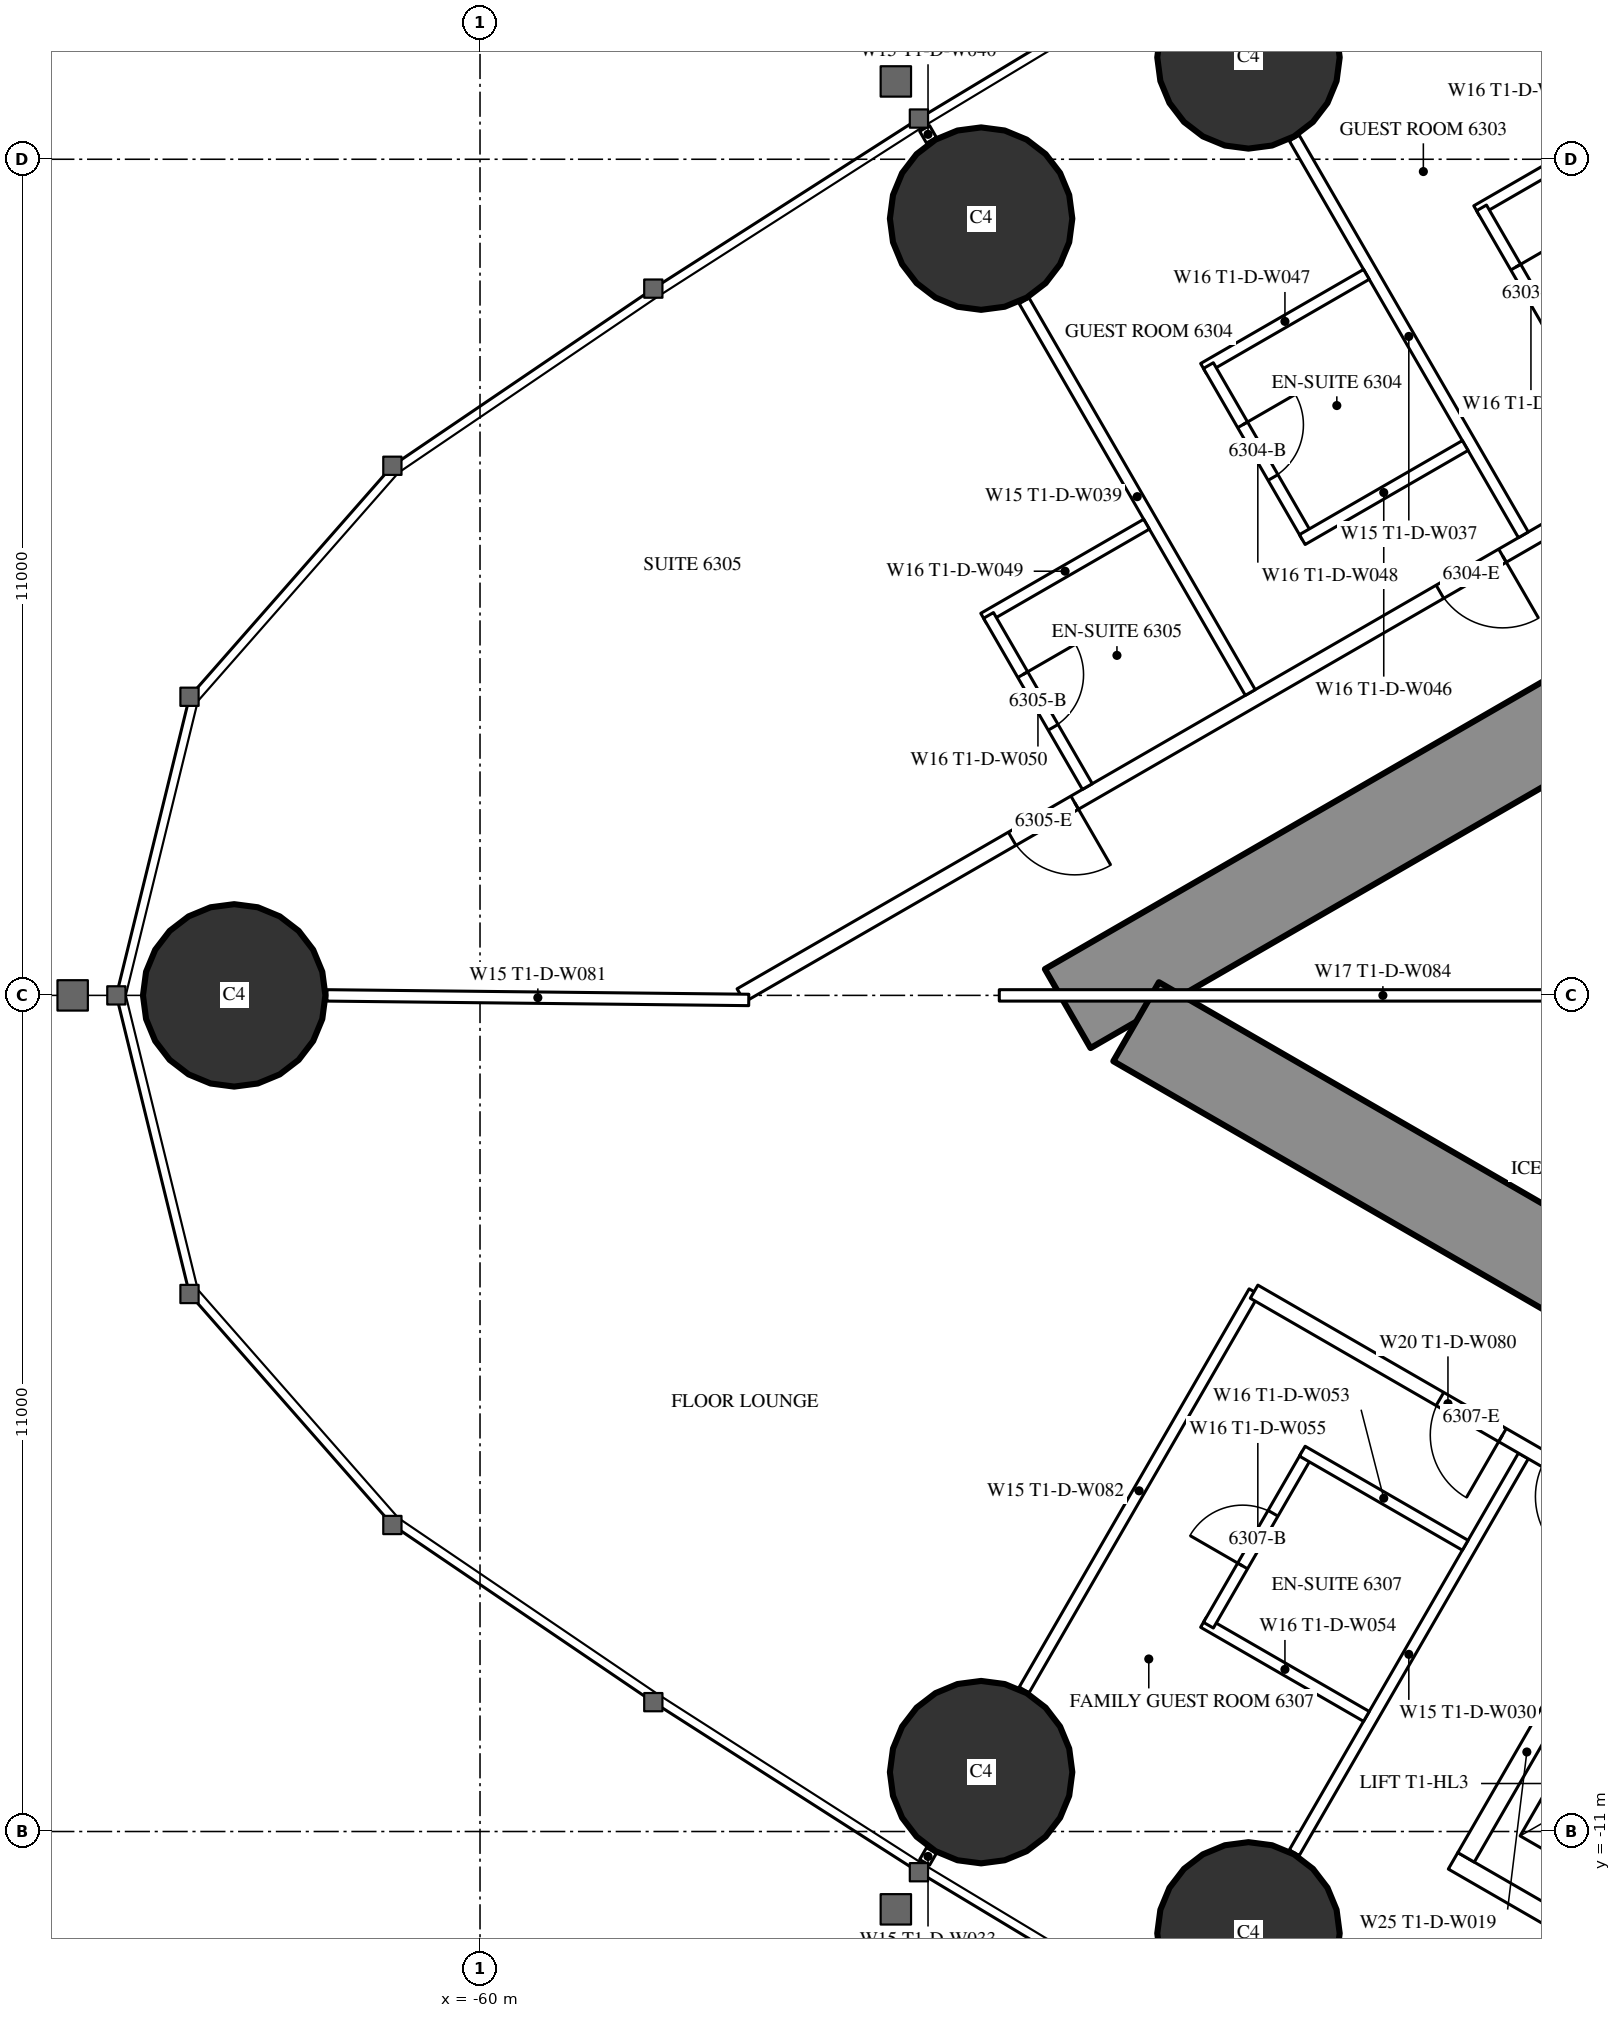
"""IFC4 building model, lengths in metres.
Left out: names, types, materials, properties, quantities, classifications, styles, units other than length and angle.
Written with IfcOpenShell. Run it as: python <this file> out.ifc"""

import sys

from ifc_helpers import new_model, si_unit, direction, frame, frame_2d, origin, origin_2d, place, context, subcontext, project, spatial, rectangle, circle, extrude, element, fill, save


model = new_model("IFC4")
c1 = context("Model", 3, precision=1e-05, world=origin(), true_north=direction((0.0, 1.0)))
c2 = subcontext(c1, "Body", "Model", "MODEL_VIEW")
j1 = project(units=[si_unit("LENGTHUNIT", "METRE"), si_unit("PLANEANGLEUNIT", "RADIAN")], contexts=[c1])
p1 = place(None, origin())
s1 = spatial("IfcSite", under=j1, at=p1, CompositionType="ELEMENT")
p2 = place(p1, origin())
s2 = spatial("IfcBuilding", under=s1, at=p2, CompositionType="ELEMENT")
p3 = place(p2, frame((0.0, 0.0, 236.9)))
s3 = spatial("IfcBuildingStorey", under=s2, at=p3, CompositionType="ELEMENT", Elevation=236.9)
for number, where, z_axis, x_axis in (
    (1, (-63.234, 0.0, 0.0), (0.0, 0.0, 1.0), (1.0, 0.0, 0.0)),
    (2, (-53.408, -10.219, 0.0), (0.0, 0.0, 1.0), (1.0, 0.0, 0.0)),
    (3, (-49.89, -12.34, 0.0), (0.0, 0.0, 1.0), (1.0, 0.0, 0.0)),
    (4, (-49.89, 12.34, 0.0), (0.0, 0.0, 1.0), (1.0, 0.0, 0.0)),
    (5, (-53.408, 10.219, 0.0), (0.0, 0.0, 1.0), (1.0, 0.0, 0.0)),
):
    element("IfcColumn", number, at=place(p3, frame(where, z_axis=z_axis, x_axis=x_axis)), inside=s3, PredefinedType="COLUMN", context=c2, shape_type="SweptSolid", body=[
        extrude(circle(Radius=1.2, at=origin_2d()), origin(), (0.0, 0.0, 1.0), 3.6),
    ])
p4 = place(p3, frame((-27.2, 14.3, 0.0), z_axis=(0.0, 0.0, 1.0), x_axis=(-0.866026593062, -0.499997940104, 0.0)))
e6 = element("IfcWall", 6, at=p4, inside=s3, PredefinedType="SHEAR", context=c2, shape_type="SweptSolid", body=[
    extrude(rectangle(XDim=28.946, YDim=1.2, at=frame_2d((14.473, 0.0))), origin(), (0.0, 0.0, 1.0), 3.6),
])
p5 = place(p4, frame((4.6, 0.0, 0.0)))
e7 = element("IfcOpeningElement", 7, at=p5, cuts=e6, PredefinedType="OPENING", context=c2, shape_type="SweptSolid", body=[
    extrude(rectangle(XDim=1.0, YDim=2.2, at=frame_2d((0.5, 1.1))), frame((0.0, 0.61, 0.0), z_axis=(0.0, -1.0, 0.0), x_axis=(1.0, 0.0, 0.0)), (0.0, 0.0, 1.0), 1.22),
])
p6 = place(p4, frame((13.395, 0.0, 0.0)))
e8 = element("IfcOpeningElement", 8, at=p6, cuts=e6, PredefinedType="OPENING", context=c2, shape_type="SweptSolid", body=[
    extrude(rectangle(XDim=1.8, YDim=2.2, at=frame_2d((0.9, 1.1))), frame((0.0, 0.61, 0.0), z_axis=(0.0, -1.0, 0.0), x_axis=(1.0, 0.0, 0.0)), (0.0, 0.0, 1.0), 1.22),
])
p7 = place(p3, frame((-27.2, -14.3, 0.0), z_axis=(0.0, 0.0, 1.0), x_axis=(-0.866024021859, 0.500002393557, 0.0)))
e9 = element("IfcWall", 9, at=p7, inside=s3, PredefinedType="SHEAR", context=c2, shape_type="SweptSolid", body=[
    extrude(rectangle(XDim=27.907, YDim=1.2, at=frame_2d((13.954, 0.0))), origin(), (0.0, 0.0, 1.0), 3.6),
])
p8 = place(p7, frame((4.6, 0.0, 0.0)))
e10 = element("IfcOpeningElement", 10, at=p8, cuts=e9, PredefinedType="OPENING", context=c2, shape_type="SweptSolid", body=[
    extrude(rectangle(XDim=1.0, YDim=2.2, at=frame_2d((0.5, 1.1))), frame((0.0, 0.61, 0.0), z_axis=(0.0, -1.0, 0.0), x_axis=(1.0, 0.0, 0.0)), (0.0, 0.0, 1.0), 1.22),
])
p9 = place(p7, frame((13.395, 0.0, 0.0)))
e11 = element("IfcOpeningElement", 11, at=p9, cuts=e9, PredefinedType="OPENING", context=c2, shape_type="SweptSolid", body=[
    extrude(rectangle(XDim=1.8, YDim=2.2, at=frame_2d((0.9, 1.1))), frame((0.0, 0.61, 0.0), z_axis=(0.0, -1.0, 0.0), x_axis=(1.0, 0.0, 0.0)), (0.0, 0.0, 1.0), 1.22),
])
p10 = place(p3, frame((-28.737, 16.068, 0.0), z_axis=(0.0, 0.0, 1.0), x_axis=(-0.866026057212, -0.499998868229, 0.0)))
e12 = element("IfcWall", 12, at=p10, inside=s3, PredefinedType="PARTITIONING", context=c2, shape_type="SweptSolid", body=[
    extrude(rectangle(XDim=32.137, YDim=0.2, at=frame_2d((16.068, 0.0))), origin(), (0.0, 0.0, 1.0), 3.35),
])
p11 = place(p10, frame((1.08, 0.0, 0.0)))
e13 = element("IfcOpeningElement", 13, at=p11, cuts=e12, PredefinedType="OPENING", context=c2, shape_type="SweptSolid", body=[
    extrude(rectangle(XDim=1.8, YDim=2.03, at=frame_2d((0.9, 1.015))), frame((0.0, 0.11, 0.0), z_axis=(0.0, -1.0, 0.0), x_axis=(1.0, 0.0, 0.0)), (0.0, 0.0, 1.0), 0.22),
])
p12 = place(p10, frame((6.86, 0.0, 0.0)))
e14 = element("IfcOpeningElement", 14, at=p12, cuts=e12, PredefinedType="OPENING", context=c2, shape_type="SweptSolid", body=[
    extrude(rectangle(XDim=1.0, YDim=2.2, at=frame_2d((0.5, 1.1))), frame((0.0, 0.11, 0.0), z_axis=(0.0, -1.0, 0.0), x_axis=(1.0, 0.0, 0.0)), (0.0, 0.0, 1.0), 0.22),
])
p13 = place(p10, frame((16.418, 0.0, 0.0)))
e15 = element("IfcOpeningElement", 15, at=p13, cuts=e12, PredefinedType="OPENING", context=c2, shape_type="SweptSolid", body=[
    extrude(rectangle(XDim=0.95, YDim=2.2, at=frame_2d((0.475, 1.1))), frame((0.0, 0.11, 0.0), z_axis=(0.0, -1.0, 0.0), x_axis=(1.0, 0.0, 0.0)), (0.0, 0.0, 1.0), 0.22),
])
p14 = place(p10, frame((20.567, 0.0, 0.0)))
e16 = element("IfcOpeningElement", 16, at=p14, cuts=e12, PredefinedType="OPENING", context=c2, shape_type="SweptSolid", body=[
    extrude(rectangle(XDim=0.95, YDim=2.2, at=frame_2d((0.475, 1.1))), frame((0.0, 0.11, 0.0), z_axis=(0.0, -1.0, 0.0), x_axis=(1.0, 0.0, 0.0)), (0.0, 0.0, 1.0), 0.22),
])
p15 = place(p10, frame((27.065, 0.0, 0.0)))
e17 = element("IfcOpeningElement", 17, at=p15, cuts=e12, PredefinedType="OPENING", context=c2, shape_type="SweptSolid", body=[
    extrude(rectangle(XDim=0.95, YDim=2.2, at=frame_2d((0.475, 1.1))), frame((0.0, 0.11, 0.0), z_axis=(0.0, -1.0, 0.0), x_axis=(1.0, 0.0, 0.0)), (0.0, 0.0, 1.0), 0.22),
])
p16 = place(p3, frame((-46.274, 6.059, 0.0), z_axis=(0.0, 0.0, 1.0), x_axis=(-0.500020471368, 0.866013584312, 0.0)))
e18 = element("IfcWall", 18, at=p16, inside=s3, PredefinedType="PARTITIONING", context=c2, shape_type="SweptSolid", body=[
    extrude(rectangle(XDim=6.028, YDim=0.15, at=frame_2d((3.014, 0.0))), origin(), (0.0, 0.0, 1.0), 2.45),
])
p17 = place(p3, frame((-49.866, 3.985, 0.0), z_axis=(0.0, 0.0, 1.0), x_axis=(-0.500000694566, 0.866025002776, 0.0)))
e19 = element("IfcWall", 19, at=p17, inside=s3, PredefinedType="PARTITIONING", context=c2, shape_type="SweptSolid", body=[
    extrude(rectangle(XDim=5.95, YDim=0.15, at=frame_2d((2.975, 0.0))), origin(), (0.0, 0.0, 1.0), 2.45),
])
p18 = place(p3, frame((-54.061, 11.25, 0.0), z_axis=(0.0, 0.0, 1.0), x_axis=(-0.500391173478, 0.865799441849, 0.0)))
e20 = element("IfcWall", 20, at=p18, inside=s3, PredefinedType="PARTITIONING", context=c2, shape_type="SweptSolid", body=[
    extrude(rectangle(XDim=0.179, YDim=0.15, at=frame_2d((0.089, 0.0))), origin(), (0.0, 0.0, 1.0), 2.45),
])
p19 = place(p3, frame((-46.274, -6.059, 0.0), z_axis=(0.0, 0.0, 1.0), x_axis=(-0.500020471368, -0.866013584312, 0.0)))
e21 = element("IfcWall", 21, at=p19, inside=s3, PredefinedType="PARTITIONING", context=c2, shape_type="SweptSolid", body=[
    extrude(rectangle(XDim=6.028, YDim=0.15, at=frame_2d((3.014, 0.0))), origin(), (0.0, 0.0, 1.0), 2.45),
])
p20 = place(p3, frame((-49.816, -3.898, 0.0), z_axis=(0.0, 0.0, 1.0), x_axis=(-0.500001913541, -0.866024298998, 0.0)))
e22 = element("IfcWall", 22, at=p20, inside=s3, PredefinedType="PARTITIONING", context=c2, shape_type="SweptSolid", body=[
    extrude(rectangle(XDim=6.05, YDim=0.15, at=frame_2d((3.025, 0.0))), origin(), (0.0, 0.0, 1.0), 2.45),
])
p21 = place(p3, frame((-54.061, -11.25, 0.0), z_axis=(0.0, 0.0, 1.0), x_axis=(-0.500391173478, -0.865799441849, 0.0)))
e23 = element("IfcWall", 23, at=p21, inside=s3, PredefinedType="PARTITIONING", context=c2, shape_type="SweptSolid", body=[
    extrude(rectangle(XDim=0.179, YDim=0.15, at=frame_2d((0.089, 0.0))), origin(), (0.0, 0.0, 1.0), 2.45),
])
p22 = place(p3, frame((-56.464, -0.06, 0.0), z_axis=(0.0, 0.0, 1.0), x_axis=(-0.999941455167, 0.01082063951, 0.0)))
e24 = element("IfcWall", 24, at=p22, inside=s3, PredefinedType="PARTITIONING", context=c2, shape_type="SweptSolid", body=[
    extrude(rectangle(XDim=5.55, YDim=0.15, at=frame_2d((2.775, 0.0))), origin(), (0.0, 0.0, 1.0), 2.45),
])
p23 = place(p3, frame((-44.745, 11.56, 0.0), z_axis=(0.0, 0.0, 1.0), x_axis=(-0.866006523861, -0.500032699561, 0.0)))
e25 = element("IfcWall", 25, at=p23, inside=s3, PredefinedType="PARTITIONING", context=c2, shape_type="SweptSolid", body=[
    extrude(rectangle(XDim=2.475, YDim=0.15, at=frame_2d((1.237, 0.0))), origin(), (0.0, 0.0, 1.0), 3.35),
])
p24 = place(p3, frame((-45.524, 8.109, 0.0), z_axis=(0.0, 0.0, 1.0), x_axis=(-0.49997716683, 0.86603858612, 0.0)))
e26 = element("IfcWall", 26, at=p24, inside=s3, PredefinedType="PARTITIONING", context=c2, shape_type="SweptSolid", body=[
    extrude(rectangle(XDim=2.6, YDim=0.15, at=frame_2d((1.3, 0.0))), origin(), (0.0, 0.0, 1.0), 3.35),
])
p25 = place(p24, frame((0.9, 0.0, 0.0)))
e27 = element("IfcOpeningElement", 27, at=p25, cuts=e26, PredefinedType="OPENING", context=c2, shape_type="SweptSolid", body=[
    extrude(rectangle(XDim=0.8, YDim=2.2, at=frame_2d((0.4, 1.1))), frame((0.0, 0.085, 0.0), z_axis=(0.0, -1.0, 0.0), x_axis=(1.0, 0.0, 0.0)), (0.0, 0.0, 1.0), 0.17),
])
p26 = place(p3, frame((-48.339, 9.486, 0.0), z_axis=(0.0, 0.0, 1.0), x_axis=(-0.866006523861, -0.500032699561, 0.0)))
e28 = element("IfcWall", 28, at=p26, inside=s3, PredefinedType="PARTITIONING", context=c2, shape_type="SweptSolid", body=[
    extrude(rectangle(XDim=2.475, YDim=0.15, at=frame_2d((1.237, 0.0))), origin(), (0.0, 0.0, 1.0), 3.35),
])
p27 = place(p3, frame((-49.117, 6.034, 0.0), z_axis=(0.0, 0.0, 1.0), x_axis=(-0.500006934395, 0.866021400173, 0.0)))
e29 = element("IfcWall", 29, at=p27, inside=s3, PredefinedType="PARTITIONING", context=c2, shape_type="SweptSolid", body=[
    extrude(rectangle(XDim=2.6, YDim=0.15, at=frame_2d((1.3, 0.0))), origin(), (0.0, 0.0, 1.0), 3.35),
])
p28 = place(p27, frame((0.9, 0.0, 0.0)))
e30 = element("IfcOpeningElement", 30, at=p28, cuts=e29, PredefinedType="OPENING", context=c2, shape_type="SweptSolid", body=[
    extrude(rectangle(XDim=0.8, YDim=2.2, at=frame_2d((0.4, 1.1))), frame((0.0, 0.085, 0.0), z_axis=(0.0, -1.0, 0.0), x_axis=(1.0, 0.0, 0.0)), (0.0, 0.0, 1.0), 0.17),
])
for number, where, z_axis, x_axis in (
    (31, (-47.039, 7.234, 0.0), (0.0, 0.0, 1.0), (-0.866, -0.5, 0.0)),
    (32, (-51.231, 6.199, 0.0), (0.0, 0.0, 1.0), (-0.866, -0.5, 0.0)),
):
    element("IfcWall", number, at=place(p3, frame(where, z_axis=z_axis, x_axis=x_axis)), inside=s3, PredefinedType="PARTITIONING", context=c2, shape_type="SweptSolid", body=[
        extrude(rectangle(XDim=2.475, YDim=0.15, at=frame_2d((1.238, 0.0))), origin(), (0.0, 0.0, 1.0), 3.35),
    ])
p29 = place(p3, frame((-52.01, 2.747, 0.0), z_axis=(0.0, 0.0, 1.0), x_axis=(-0.500006934395, 0.866021400173, 0.0)))
e33 = element("IfcWall", 33, at=p29, inside=s3, PredefinedType="PARTITIONING", context=c2, shape_type="SweptSolid", body=[
    extrude(rectangle(XDim=2.6, YDim=0.15, at=frame_2d((1.3, 0.0))), origin(), (0.0, 0.0, 1.0), 3.35),
])
p30 = place(p29, frame((0.9, 0.0, 0.0)))
e34 = element("IfcOpeningElement", 34, at=p30, cuts=e33, PredefinedType="OPENING", context=c2, shape_type="SweptSolid", body=[
    extrude(rectangle(XDim=0.8, YDim=2.2, at=frame_2d((0.4, 1.1))), frame((0.0, 0.085, 0.0), z_axis=(0.0, -1.0, 0.0), x_axis=(1.0, 0.0, 0.0)), (0.0, 0.0, 1.0), 0.17),
])
p31 = place(p3, frame((-48.339, -9.486, 0.0), z_axis=(0.0, 0.0, 1.0), x_axis=(-0.866006523861, 0.500032699561, 0.0)))
e35 = element("IfcWall", 35, at=p31, inside=s3, PredefinedType="PARTITIONING", context=c2, shape_type="SweptSolid", body=[
    extrude(rectangle(XDim=2.475, YDim=0.15, at=frame_2d((1.237, 0.0))), origin(), (0.0, 0.0, 1.0), 3.35),
])
p32 = place(p3, frame((-49.117, -6.034, 0.0), z_axis=(0.0, 0.0, 1.0), x_axis=(-0.500006934395, -0.866021400173, 0.0)))
e36 = element("IfcWall", 36, at=p32, inside=s3, PredefinedType="PARTITIONING", context=c2, shape_type="SweptSolid", body=[
    extrude(rectangle(XDim=2.6, YDim=0.15, at=frame_2d((1.3, 0.0))), origin(), (0.0, 0.0, 1.0), 3.35),
])
p33 = place(p32, frame((0.9, 0.0, 0.0)))
e37 = element("IfcOpeningElement", 37, at=p33, cuts=e36, PredefinedType="OPENING", context=c2, shape_type="SweptSolid", body=[
    extrude(rectangle(XDim=0.8, YDim=2.2, at=frame_2d((0.4, 1.1))), frame((0.0, 0.085, 0.0), z_axis=(0.0, -1.0, 0.0), x_axis=(1.0, 0.0, 0.0)), (0.0, 0.0, 1.0), 0.17),
])
p34 = place(p3, frame((-47.039, -7.234, 0.0), z_axis=(0.0, 0.0, 1.0), x_axis=(-0.866073894602, 0.499916002032, 0.0)))
e38 = element("IfcWall", 38, at=p34, inside=s3, PredefinedType="PARTITIONING", context=c2, shape_type="SweptSolid", body=[
    extrude(rectangle(XDim=2.475, YDim=0.15, at=frame_2d((1.238, 0.0))), origin(), (0.0, 0.0, 1.0), 2.5),
])
p35 = place(p3, frame((-44.715, -6.844, 0.0), z_axis=(0.0, 0.0, 1.0), x_axis=(-0.866020627653, 0.50000827241, 0.0)))
e39 = element("IfcWall", 39, at=p35, inside=s3, PredefinedType="PARTITIONING", context=c2, shape_type="SweptSolid", body=[
    extrude(rectangle(XDim=5.891, YDim=0.2, at=frame_2d((2.945, 0.0))), origin(), (0.0, 0.0, 1.0), 3.35),
])
p36 = place(p35, frame((2.117, 0.0, 0.0)))
e40 = element("IfcOpeningElement", 40, at=p36, cuts=e39, PredefinedType="OPENING", context=c2, shape_type="SweptSolid", body=[
    extrude(rectangle(XDim=0.95, YDim=2.2, at=frame_2d((0.475, 1.1))), frame((0.0, 0.11, 0.0), z_axis=(0.0, -1.0, 0.0), x_axis=(1.0, 0.0, 0.0)), (0.0, 0.0, 1.0), 0.22),
])
p37 = place(p35, frame((0.5, 0.0, 0.0)))
e41 = element("IfcOpeningElement", 41, at=p37, cuts=e39, PredefinedType="OPENING", context=c2, shape_type="SweptSolid", body=[
    extrude(rectangle(XDim=0.967, YDim=2.2, at=frame_2d((0.483, 1.1))), frame((0.0, 0.11, 0.0), z_axis=(0.0, -1.0, 0.0), x_axis=(1.0, 0.0, 0.0)), (0.0, 0.0, 1.0), 0.22),
])
p38 = place(p3, frame((-43.075, 0.0, 0.0), z_axis=(0.0, 0.0, 1.0), x_axis=(-1.0, 0.0, 0.0)))
e42 = element("IfcWall", 42, at=p38, inside=s3, PredefinedType="PARTITIONING", context=c2, shape_type="SweptSolid", body=[
    extrude(rectangle(XDim=10.093, YDim=0.15, at=frame_2d((5.047, 0.0))), origin(), (0.0, 0.0, 1.0), 2.45),
])
p39 = place(p3, frame((-41.482, -14.686, 0.0), z_axis=(0.0, 0.0, 1.0), x_axis=(-0.86603344179, 0.499986077507, 0.0)))
e43 = element("IfcWall", 43, at=p39, inside=s3, PredefinedType="PARTITIONING", context=c2, shape_type="SweptSolid", body=[
    extrude(rectangle(XDim=6.6, YDim=0.25, at=frame_2d((3.3, 0.0))), origin(), (0.0, 0.0, 1.0), 3.35),
])
p40 = place(p3, frame((-45.428, -8.568, 0.0), z_axis=(0.0, 0.0, 1.0), x_axis=(-0.499929347863, -0.866066190972, 0.0)))
e44 = element("IfcWall", 44, at=p40, inside=s3, PredefinedType="PARTITIONING", context=c2, shape_type="SweptSolid", body=[
    extrude(rectangle(XDim=3.201, YDim=0.25, at=frame_2d((1.6, 0.0))), origin(), (0.0, 0.0, 1.0), 3.35),
])
p41 = place(p25, origin())
e45 = element("IfcDoor", 45, at=p41, inside=s3, OperationType="SINGLE_SWING_RIGHT", PredefinedType="DOOR", context=c2, shape_type="SweptSolid", body=[
    extrude(rectangle(XDim=0.8, YDim=2.2, at=frame_2d((0.4, 1.1))), frame((0.0, 0.025, 0.0), z_axis=(0.0, -1.0, 0.0), x_axis=(1.0, 0.0, 0.0)), (0.0, 0.0, 1.0), 0.05),
])
fill(e27, e45)
p42 = place(p28, origin())
e46 = element("IfcDoor", 46, at=p42, inside=s3, OperationType="SINGLE_SWING_RIGHT", PredefinedType="DOOR", context=c2, shape_type="SweptSolid", body=[
    extrude(rectangle(XDim=0.8, YDim=2.2, at=frame_2d((0.4, 1.1))), frame((0.0, 0.025, 0.0), z_axis=(0.0, -1.0, 0.0), x_axis=(1.0, 0.0, 0.0)), (0.0, 0.0, 1.0), 0.05),
])
fill(e30, e46)
p43 = place(p14, origin())
e47 = element("IfcDoor", 47, at=p43, inside=s3, OperationType="SINGLE_SWING_LEFT", PredefinedType="DOOR", context=c2, shape_type="SweptSolid", body=[
    extrude(rectangle(XDim=0.95, YDim=2.2, at=frame_2d((0.475, 1.1))), frame((0.0, 0.025, 0.0), z_axis=(0.0, -1.0, 0.0), x_axis=(1.0, 0.0, 0.0)), (0.0, 0.0, 1.0), 0.05),
])
fill(e16, e47)
p44 = place(p30, origin())
e48 = element("IfcDoor", 48, at=p44, inside=s3, OperationType="SINGLE_SWING_RIGHT", PredefinedType="DOOR", context=c2, shape_type="SweptSolid", body=[
    extrude(rectangle(XDim=0.8, YDim=2.2, at=frame_2d((0.4, 1.1))), frame((0.0, 0.025, 0.0), z_axis=(0.0, -1.0, 0.0), x_axis=(1.0, 0.0, 0.0)), (0.0, 0.0, 1.0), 0.05),
])
fill(e34, e48)
p45 = place(p15, origin())
e49 = element("IfcDoor", 49, at=p45, inside=s3, OperationType="SINGLE_SWING_LEFT", PredefinedType="DOOR", context=c2, shape_type="SweptSolid", body=[
    extrude(rectangle(XDim=0.95, YDim=2.2, at=frame_2d((0.475, 1.1))), frame((0.0, 0.025, 0.0), z_axis=(0.0, -1.0, 0.0), x_axis=(1.0, 0.0, 0.0)), (0.0, 0.0, 1.0), 0.05),
])
fill(e17, e49)
p46 = place(p33, origin())
e50 = element("IfcDoor", 50, at=p46, inside=s3, OperationType="SINGLE_SWING_RIGHT", PredefinedType="DOOR", context=c2, shape_type="SweptSolid", body=[
    extrude(rectangle(XDim=0.8, YDim=2.2, at=frame_2d((0.4, 1.1))), frame((0.0, 0.025, 0.0), z_axis=(0.0, -1.0, 0.0), x_axis=(1.0, 0.0, 0.0)), (0.0, 0.0, 1.0), 0.05),
])
fill(e37, e50)
p47 = place(p36, origin())
e51 = element("IfcDoor", 51, at=p47, inside=s3, OperationType="SINGLE_SWING_LEFT", PredefinedType="DOOR", context=c2, shape_type="SweptSolid", body=[
    extrude(rectangle(XDim=0.95, YDim=2.2, at=frame_2d((0.475, 1.1))), frame((0.0, 0.025, 0.0), z_axis=(0.0, -1.0, 0.0), x_axis=(1.0, 0.0, 0.0)), (0.0, 0.0, 1.0), 0.05),
])
fill(e40, e51)
save(model, sys.argv[1])
